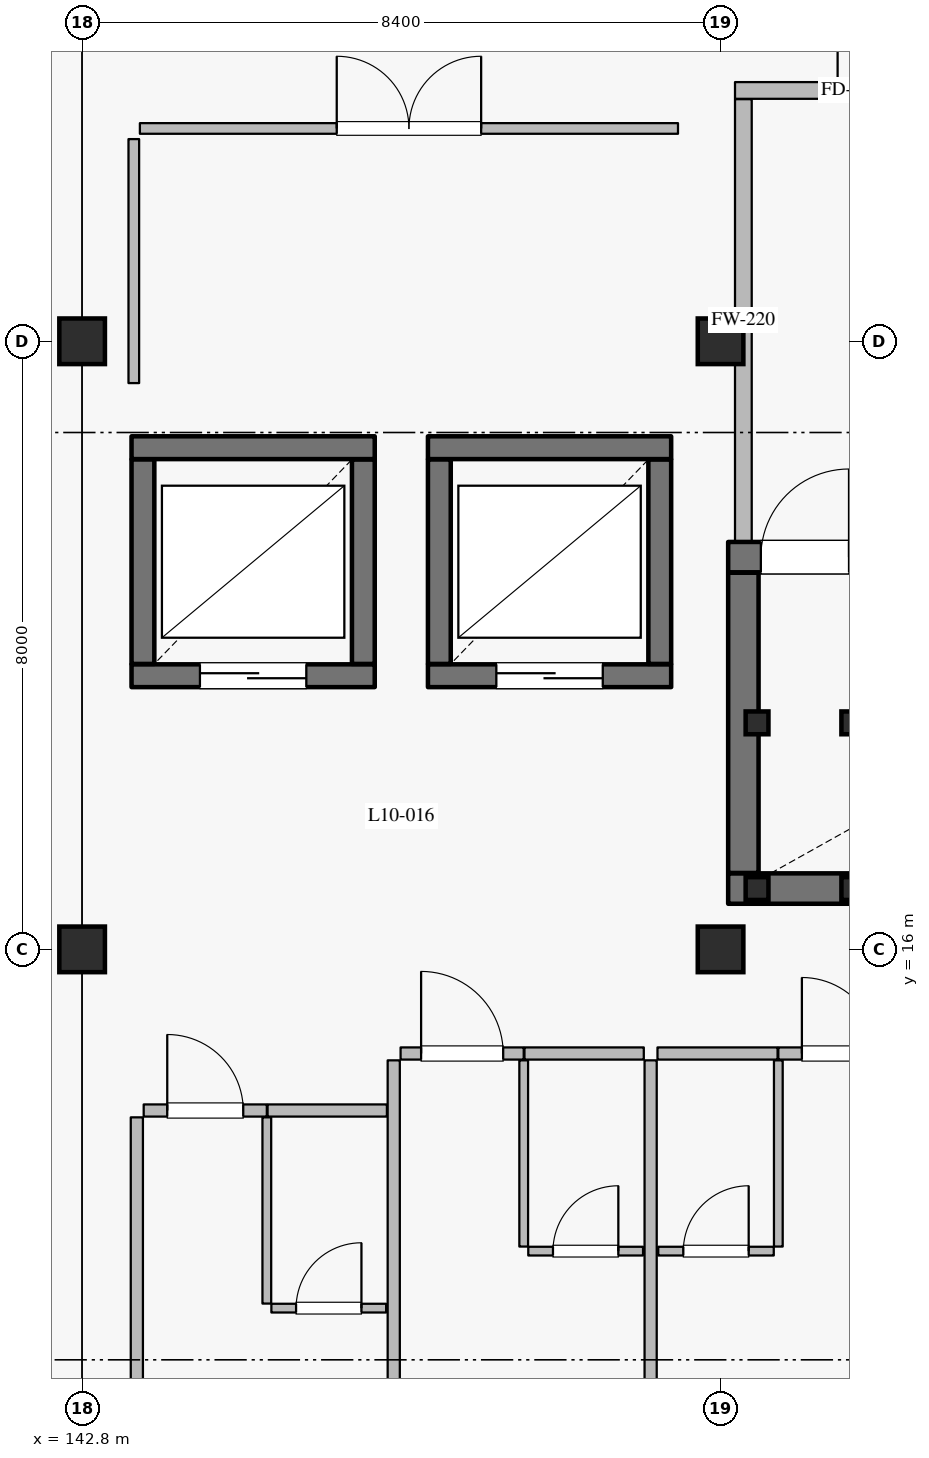
"""IFC4 building model, lengths in metres.
Left out: names, types, materials, properties, quantities, classifications, styles, units other than length and angle.
Written with IfcOpenShell. Run it as: python <this file> out.ifc"""

import sys

from ifc_helpers import new_model, si_unit, direction, frame, frame_2d, origin, origin_2d, place, context, subcontext, project, spatial, rectangle, hollow_rectangle, extrude, element, fill, save


model = new_model("IFC4")
c1 = context("Model", 3, precision=1e-05, world=origin(), true_north=direction((0.0, 1.0)))
c2 = subcontext(c1, "Body", "Model", "MODEL_VIEW")
j1 = project(units=[si_unit("LENGTHUNIT", "METRE"), si_unit("PLANEANGLEUNIT", "RADIAN")], contexts=[c1])
p1 = place(None, origin())
s1 = spatial("IfcSite", under=j1, at=p1, CompositionType="ELEMENT")
p2 = place(p1, origin())
s2 = spatial("IfcBuilding", under=s1, at=p2, CompositionType="ELEMENT")
p3 = place(p2, frame((0.0, 0.0, 43.2)))
s3 = spatial("IfcBuildingStorey", under=s2, at=p3, CompositionType="ELEMENT", Elevation=43.2)
for number, where, z_axis, x_axis in (
    (1, (142.8, 16.0, 0.0), (0.0, 0.0, 1.0), (1.0, 0.0, 0.0)),
    (2, (151.2, 24.0, 0.0), (0.0, 0.0, 1.0), (1.0, 0.0, 0.0)),
    (3, (142.8, 24.0, 0.0), (0.0, 0.0, 1.0), (1.0, 0.0, 0.0)),
    (4, (151.2, 16.0, 0.0), (0.0, 0.0, 1.0), (1.0, 0.0, 0.0)),
):
    element("IfcColumn", number, at=place(p3, frame(where, z_axis=z_axis, x_axis=x_axis)), inside=s3, PredefinedType="COLUMN", context=c2, shape_type="SweptSolid", body=[
        extrude(rectangle(XDim=0.6, YDim=0.6, at=origin_2d()), origin(), (0.0, 0.0, 1.0), 4.2),
    ])
p4 = place(p3, frame((143.45, 19.6, 0.0), z_axis=(0.0, 0.0, 1.0), x_axis=(1.0, 0.0, 0.0)))
e5 = element("IfcWall", 5, at=p4, inside=s3, PredefinedType="SHEAR", context=c2, shape_type="SweptSolid", body=[
    extrude(rectangle(XDim=3.2, YDim=0.3, at=frame_2d((1.6, 0.0))), origin(), (0.0, 0.0, 1.0), 3.935),
])
p5 = place(p4, frame((0.9, 0.0, 0.0)))
e6 = element("IfcOpeningElement", 6, at=p5, cuts=e5, PredefinedType="OPENING", context=c2, shape_type="SweptSolid", body=[
    extrude(rectangle(XDim=1.4, YDim=2.35, at=frame_2d((0.7, 1.175))), frame((0.0, 0.16, 0.0), z_axis=(0.0, -1.0, 0.0), x_axis=(1.0, 0.0, 0.0)), (0.0, 0.0, 1.0), 0.32),
])
p6 = place(p3, frame((146.5, 19.755, 0.0), z_axis=(0.0, 0.0, 1.0), x_axis=(0.0, 1.0, 0.0)))
e7 = element("IfcWall", 7, at=p6, inside=s3, PredefinedType="SHEAR", context=c2, shape_type="SweptSolid", body=[
    extrude(rectangle(XDim=2.69, YDim=0.3, at=frame_2d((1.345, 0.0))), origin(), (0.0, 0.0, 1.0), 3.935),
])
p7 = place(p3, frame((146.65, 22.6, 0.0), z_axis=(0.0, 0.0, 1.0), x_axis=(-1.0, 0.0, 0.0)))
e8 = element("IfcWall", 8, at=p7, inside=s3, PredefinedType="SHEAR", context=c2, shape_type="SweptSolid", body=[
    extrude(rectangle(XDim=3.2, YDim=0.3, at=frame_2d((1.6, 0.0))), origin(), (0.0, 0.0, 1.0), 3.935),
])
p8 = place(p3, frame((143.6, 22.445, 0.0), z_axis=(0.0, 0.0, 1.0), x_axis=(0.0, -1.0, 0.0)))
e9 = element("IfcWall", 9, at=p8, inside=s3, PredefinedType="SHEAR", context=c2, shape_type="SweptSolid", body=[
    extrude(rectangle(XDim=2.69, YDim=0.3, at=frame_2d((1.345, 0.0))), origin(), (0.0, 0.0, 1.0), 3.935),
])
p9 = place(p3, frame((147.35, 19.6, 0.0), z_axis=(0.0, 0.0, 1.0), x_axis=(1.0, 0.0, 0.0)))
e10 = element("IfcWall", 10, at=p9, inside=s3, PredefinedType="SHEAR", context=c2, shape_type="SweptSolid", body=[
    extrude(rectangle(XDim=3.2, YDim=0.3, at=frame_2d((1.6, 0.0))), origin(), (0.0, 0.0, 1.0), 3.935),
])
p10 = place(p9, frame((0.9, 0.0, 0.0)))
e11 = element("IfcOpeningElement", 11, at=p10, cuts=e10, PredefinedType="OPENING", context=c2, shape_type="SweptSolid", body=[
    extrude(rectangle(XDim=1.4, YDim=2.35, at=frame_2d((0.7, 1.175))), frame((0.0, 0.16, 0.0), z_axis=(0.0, -1.0, 0.0), x_axis=(1.0, 0.0, 0.0)), (0.0, 0.0, 1.0), 0.32),
])
p11 = place(p3, frame((150.4, 19.755, 0.0), z_axis=(0.0, 0.0, 1.0), x_axis=(0.0, 1.0, 0.0)))
e12 = element("IfcWall", 12, at=p11, inside=s3, PredefinedType="SHEAR", context=c2, shape_type="SweptSolid", body=[
    extrude(rectangle(XDim=2.69, YDim=0.3, at=frame_2d((1.345, 0.0))), origin(), (0.0, 0.0, 1.0), 3.935),
])
p12 = place(p3, frame((150.55, 22.6, 0.0), z_axis=(0.0, 0.0, 1.0), x_axis=(-1.0, 0.0, 0.0)))
e13 = element("IfcWall", 13, at=p12, inside=s3, PredefinedType="SHEAR", context=c2, shape_type="SweptSolid", body=[
    extrude(rectangle(XDim=3.2, YDim=0.3, at=frame_2d((1.6, 0.0))), origin(), (0.0, 0.0, 1.0), 3.935),
])
p13 = place(p3, frame((147.5, 22.445, 0.0), z_axis=(0.0, 0.0, 1.0), x_axis=(0.0, -1.0, 0.0)))
e14 = element("IfcWall", 14, at=p13, inside=s3, PredefinedType="SHEAR", context=c2, shape_type="SweptSolid", body=[
    extrude(rectangle(XDim=2.69, YDim=0.3, at=frame_2d((1.345, 0.0))), origin(), (0.0, 0.0, 1.0), 3.935),
])
p14 = place(p3, frame((151.3, 16.8, 0.0), z_axis=(0.0, 0.0, 1.0), x_axis=(1.0, 0.0, 0.0)))
e15 = element("IfcWall", 15, at=p14, inside=s3, PredefinedType="SHEAR", context=c2, shape_type="SweptSolid", body=[
    extrude(rectangle(XDim=8.2, YDim=0.4, at=frame_2d((4.1, 0.0))), origin(), (0.0, 0.0, 1.0), 3.935),
])
p15 = place(p3, frame((151.3, 21.16, 0.0), z_axis=(0.0, 0.0, 1.0), x_axis=(1.0, 0.0, 0.0)))
e16 = element("IfcWall", 16, at=p15, inside=s3, PredefinedType="SHEAR", context=c2, shape_type="SweptSolid", body=[
    extrude(rectangle(XDim=8.2, YDim=0.4, at=frame_2d((4.1, 0.0))), origin(), (0.0, 0.0, 1.0), 3.935),
])
p16 = place(p15, frame((0.43, 0.0, 0.0)))
e17 = element("IfcOpeningElement", 17, at=p16, cuts=e16, PredefinedType="OPENING", context=c2, shape_type="SweptSolid", body=[
    extrude(rectangle(XDim=1.16, YDim=2.2, at=frame_2d((0.58, 1.1))), frame((0.0, 0.21, 0.0), z_axis=(0.0, -1.0, 0.0), x_axis=(1.0, 0.0, 0.0)), (0.0, 0.0, 1.0), 0.42),
])
p17 = place(p3, frame((151.5, 17.005, 0.0), z_axis=(0.0, 0.0, 1.0), x_axis=(0.0, 1.0, 0.0)))
e18 = element("IfcWall", 18, at=p17, inside=s3, PredefinedType="SHEAR", context=c2, shape_type="SweptSolid", body=[
    extrude(rectangle(XDim=3.95, YDim=0.4, at=frame_2d((1.975, 0.0))), origin(), (0.0, 0.0, 1.0), 3.935),
])
p18 = place(p3, frame((151.5, 21.365, 0.0), z_axis=(0.0, 0.0, 1.0), x_axis=(0.0, 1.0, 0.0)))
e19 = element("IfcWall", 19, at=p18, inside=s3, PredefinedType="PARTITIONING", context=c2, shape_type="SweptSolid", body=[
    extrude(rectangle(XDim=5.82, YDim=0.22, at=frame_2d((2.91, 0.0))), origin(), (0.0, 0.0, 1.0), 3.935),
])
p19 = place(p3, frame((151.39, 27.3, 0.0), z_axis=(0.0, 0.0, 1.0), x_axis=(1.0, 0.0, 0.0)))
e20 = element("IfcWall", 20, at=p19, inside=s3, PredefinedType="PARTITIONING", context=c2, shape_type="SweptSolid", body=[
    extrude(rectangle(XDim=3.82, YDim=0.22, at=frame_2d((1.91, 0.0))), origin(), (0.0, 0.0, 1.0), 3.935),
])
p20 = place(p19, frame((1.35, 0.0, 0.0)))
e21 = element("IfcOpeningElement", 21, at=p20, cuts=e20, PredefinedType="OPENING", context=c2, shape_type="SweptSolid", body=[
    extrude(rectangle(XDim=1.12, YDim=2.2, at=frame_2d((0.56, 1.1))), frame((0.0, 0.12, 0.0), z_axis=(0.0, -1.0, 0.0), x_axis=(1.0, 0.0, 0.0)), (0.0, 0.0, 1.0), 0.24),
])
for number, where, z_axis, x_axis in (
    (22, (151.68, 16.8, 0.0), (0.0, 0.0, 1.0), (1.0, 0.0, 0.0)),
    (23, (151.68, 18.98, 0.0), (0.0, 0.0, 1.0), (1.0, 0.0, 0.0)),
    (24, (152.94, 16.8, 0.0), (0.0, 0.0, 1.0), (1.0, 0.0, 0.0)),
    (25, (152.94, 18.98, 0.0), (0.0, 0.0, 1.0), (1.0, 0.0, 0.0)),
):
    element("IfcColumn", number, at=place(p3, frame(where, z_axis=z_axis, x_axis=x_axis)), inside=s3, PredefinedType="COLUMN", context=c2, shape_type="SweptSolid", body=[
        extrude(hollow_rectangle(XDim=0.3, YDim=0.3, WallThickness=0.012, at=origin_2d()), origin(), (0.0, 0.0, 1.0), 4.02),
    ])
p21 = place(p3, frame((143.61, 13.88, 0.0), z_axis=(0.0, 0.0, 1.0), x_axis=(1.0, 0.0, 0.0)))
e26 = element("IfcWall", 26, at=p21, inside=s3, PredefinedType="PARTITIONING", context=c2, shape_type="SweptSolid", body=[
    extrude(rectangle(XDim=1.62, YDim=0.16, at=frame_2d((0.81, 0.0))), origin(), (0.0, 0.0, 1.0), 3.935),
])
p22 = place(p21, frame((0.31, 0.0, 0.0)))
e27 = element("IfcOpeningElement", 27, at=p22, cuts=e26, PredefinedType="OPENING", context=c2, shape_type="SweptSolid", body=[
    extrude(rectangle(XDim=1.0, YDim=2.25, at=frame_2d((0.5, 1.125))), frame((0.0, 0.09, 0.0), z_axis=(0.0, -1.0, 0.0), x_axis=(1.0, 0.0, 0.0)), (0.0, 0.0, 1.0), 0.18),
])
p23 = place(p3, frame((145.24, 13.88, 0.0), z_axis=(0.0, 0.0, 1.0), x_axis=(1.0, 0.0, 0.0)))
e28 = element("IfcWall", 28, at=p23, inside=s3, PredefinedType="PARTITIONING", context=c2, shape_type="SweptSolid", body=[
    extrude(rectangle(XDim=1.57, YDim=0.16, at=frame_2d((0.785, 0.0))), origin(), (0.0, 0.0, 1.0), 3.935),
])
p24 = place(p3, frame((145.23, 11.34, 0.0), z_axis=(0.0, 0.0, 1.0), x_axis=(0.0, 1.0, 0.0)))
e29 = element("IfcWall", 29, at=p24, inside=s3, PredefinedType="PARTITIONING", context=c2, shape_type="SweptSolid", body=[
    extrude(rectangle(XDim=2.45, YDim=0.115, at=frame_2d((1.225, 0.0))), origin(), (0.0, 0.0, 1.0), 3.935),
])
p25 = place(p3, frame((145.29, 11.28, 0.0), z_axis=(0.0, 0.0, 1.0), x_axis=(1.0, 0.0, 0.0)))
e30 = element("IfcWall", 30, at=p25, inside=s3, PredefinedType="PARTITIONING", context=c2, shape_type="SweptSolid", body=[
    extrude(rectangle(XDim=1.51, YDim=0.115, at=frame_2d((0.755, 0.0))), origin(), (0.0, 0.0, 1.0), 3.935),
])
p26 = place(p25, frame((0.325, 0.0, 0.0)))
e31 = element("IfcOpeningElement", 31, at=p26, cuts=e30, PredefinedType="OPENING", context=c2, shape_type="SweptSolid", body=[
    extrude(rectangle(XDim=0.86, YDim=2.12, at=frame_2d((0.43, 1.06))), frame((0.0, 0.067, 0.0), z_axis=(0.0, -1.0, 0.0), x_axis=(1.0, 0.0, 0.0)), (0.0, 0.0, 1.0), 0.135),
])
p27 = place(p3, frame((143.52, 4.24, 0.0), z_axis=(0.0, 0.0, 1.0), x_axis=(0.0, 1.0, 0.0)))
e32 = element("IfcWall", 32, at=p27, inside=s3, PredefinedType="PARTITIONING", context=c2, shape_type="SweptSolid", body=[
    extrude(rectangle(XDim=9.55, YDim=0.16, at=frame_2d((4.775, 0.0))), origin(), (0.0, 0.0, 1.0), 3.935),
])
p28 = place(p3, frame((146.99, 14.63, 0.0), z_axis=(0.0, 0.0, 1.0), x_axis=(1.0, 0.0, 0.0)))
e33 = element("IfcWall", 33, at=p28, inside=s3, PredefinedType="PARTITIONING", context=c2, shape_type="SweptSolid", body=[
    extrude(rectangle(XDim=1.62, YDim=0.16, at=frame_2d((0.81, 0.0))), origin(), (0.0, 0.0, 1.0), 3.935),
])
p29 = place(p28, frame((0.27, 0.0, 0.0)))
e34 = element("IfcOpeningElement", 34, at=p29, cuts=e33, PredefinedType="OPENING", context=c2, shape_type="SweptSolid", body=[
    extrude(rectangle(XDim=1.08, YDim=2.3, at=frame_2d((0.54, 1.15))), frame((0.0, 0.09, 0.0), z_axis=(0.0, -1.0, 0.0), x_axis=(1.0, 0.0, 0.0)), (0.0, 0.0, 1.0), 0.18),
])
p30 = place(p3, frame((148.62, 14.63, 0.0), z_axis=(0.0, 0.0, 1.0), x_axis=(1.0, 0.0, 0.0)))
e35 = element("IfcWall", 35, at=p30, inside=s3, PredefinedType="PARTITIONING", context=c2, shape_type="SweptSolid", body=[
    extrude(rectangle(XDim=1.57, YDim=0.16, at=frame_2d((0.785, 0.0))), origin(), (0.0, 0.0, 1.0), 3.935),
])
p31 = place(p3, frame((148.61, 12.09, 0.0), z_axis=(0.0, 0.0, 1.0), x_axis=(0.0, 1.0, 0.0)))
e36 = element("IfcWall", 36, at=p31, inside=s3, PredefinedType="PARTITIONING", context=c2, shape_type="SweptSolid", body=[
    extrude(rectangle(XDim=2.45, YDim=0.115, at=frame_2d((1.225, 0.0))), origin(), (0.0, 0.0, 1.0), 3.935),
])
p32 = place(p3, frame((148.67, 12.03, 0.0), z_axis=(0.0, 0.0, 1.0), x_axis=(1.0, 0.0, 0.0)))
e37 = element("IfcWall", 37, at=p32, inside=s3, PredefinedType="PARTITIONING", context=c2, shape_type="SweptSolid", body=[
    extrude(rectangle(XDim=1.51, YDim=0.115, at=frame_2d((0.755, 0.0))), origin(), (0.0, 0.0, 1.0), 3.935),
])
p33 = place(p32, frame((0.325, 0.0, 0.0)))
e38 = element("IfcOpeningElement", 38, at=p33, cuts=e37, PredefinedType="OPENING", context=c2, shape_type="SweptSolid", body=[
    extrude(rectangle(XDim=0.86, YDim=2.12, at=frame_2d((0.43, 1.06))), frame((0.0, 0.067, 0.0), z_axis=(0.0, -1.0, 0.0), x_axis=(1.0, 0.0, 0.0)), (0.0, 0.0, 1.0), 0.135),
])
p34 = place(p3, frame((146.9, 7.46, 0.0), z_axis=(0.0, 0.0, 1.0), x_axis=(0.0, 1.0, 0.0)))
e39 = element("IfcWall", 39, at=p34, inside=s3, PredefinedType="PARTITIONING", context=c2, shape_type="SweptSolid", body=[
    extrude(rectangle(XDim=7.08, YDim=0.16, at=frame_2d((3.54, 0.0))), origin(), (0.0, 0.0, 1.0), 3.935),
])
p35 = place(p3, frame((150.37, 14.63, 0.0), z_axis=(0.0, 0.0, 1.0), x_axis=(1.0, 0.0, 0.0)))
e40 = element("IfcWall", 40, at=p35, inside=s3, PredefinedType="PARTITIONING", context=c2, shape_type="SweptSolid", body=[
    extrude(rectangle(XDim=1.58, YDim=0.16, at=frame_2d((0.79, 0.0))), origin(), (0.0, 0.0, 1.0), 3.935),
])
p36 = place(p3, frame((151.96, 14.63, 0.0), z_axis=(0.0, 0.0, 1.0), x_axis=(1.0, 0.0, 0.0)))
e41 = element("IfcWall", 41, at=p36, inside=s3, PredefinedType="PARTITIONING", context=c2, shape_type="SweptSolid", body=[
    extrude(rectangle(XDim=1.62, YDim=0.16, at=frame_2d((0.81, 0.0))), origin(), (0.0, 0.0, 1.0), 3.935),
])
p37 = place(p36, frame((0.31, 0.0, 0.0)))
e42 = element("IfcOpeningElement", 42, at=p37, cuts=e41, PredefinedType="OPENING", context=c2, shape_type="SweptSolid", body=[
    extrude(rectangle(XDim=1.0, YDim=2.25, at=frame_2d((0.5, 1.125))), frame((0.0, 0.09, 0.0), z_axis=(0.0, -1.0, 0.0), x_axis=(1.0, 0.0, 0.0)), (0.0, 0.0, 1.0), 0.18),
])
p38 = place(p3, frame((151.96, 12.09, 0.0), z_axis=(0.0, 0.0, 1.0), x_axis=(0.0, 1.0, 0.0)))
e43 = element("IfcWall", 43, at=p38, inside=s3, PredefinedType="PARTITIONING", context=c2, shape_type="SweptSolid", body=[
    extrude(rectangle(XDim=2.45, YDim=0.115, at=frame_2d((1.225, 0.0))), origin(), (0.0, 0.0, 1.0), 3.935),
])
p39 = place(p3, frame((150.38, 12.03, 0.0), z_axis=(0.0, 0.0, 1.0), x_axis=(1.0, 0.0, 0.0)))
e44 = element("IfcWall", 44, at=p39, inside=s3, PredefinedType="PARTITIONING", context=c2, shape_type="SweptSolid", body=[
    extrude(rectangle(XDim=1.52, YDim=0.115, at=frame_2d((0.76, 0.0))), origin(), (0.0, 0.0, 1.0), 3.935),
])
p40 = place(p39, frame((0.33, 0.0, 0.0)))
e45 = element("IfcOpeningElement", 45, at=p40, cuts=e44, PredefinedType="OPENING", context=c2, shape_type="SweptSolid", body=[
    extrude(rectangle(XDim=0.86, YDim=2.12, at=frame_2d((0.43, 1.06))), frame((0.0, 0.067, 0.0), z_axis=(0.0, -1.0, 0.0), x_axis=(1.0, 0.0, 0.0)), (0.0, 0.0, 1.0), 0.135),
])
p41 = place(p3, frame((150.28, 8.34, 0.0), z_axis=(0.0, 0.0, 1.0), x_axis=(0.0, 1.0, 0.0)))
e46 = element("IfcWall", 46, at=p41, inside=s3, PredefinedType="PARTITIONING", context=c2, shape_type="SweptSolid", body=[
    extrude(rectangle(XDim=6.2, YDim=0.16, at=frame_2d((3.1, 0.0))), origin(), (0.0, 0.0, 1.0), 3.935),
])
p42 = place(p3, frame((143.56, 26.8, 0.0), z_axis=(0.0, 0.0, 1.0), x_axis=(1.0, 0.0, 0.0)))
e47 = element("IfcWall", 47, at=p42, inside=s3, PredefinedType="PARTITIONING", context=c2, shape_type="SweptSolid", body=[
    extrude(rectangle(XDim=7.08, YDim=0.14, at=frame_2d((3.54, 0.0))), origin(), (0.0, 0.0, 1.0), 3.935),
])
p43 = place(p42, frame((2.59, 0.0, 0.0)))
e48 = element("IfcOpeningElement", 48, at=p43, cuts=e47, PredefinedType="OPENING", context=c2, shape_type="SweptSolid", body=[
    extrude(rectangle(XDim=1.9, YDim=2.4, at=frame_2d((0.95, 1.2))), frame((0.0, 0.08, 0.0), z_axis=(0.0, -1.0, 0.0), x_axis=(1.0, 0.0, 0.0)), (0.0, 0.0, 1.0), 0.16),
])
p44 = place(p3, frame((143.48, 23.45, 0.0), z_axis=(0.0, 0.0, 1.0), x_axis=(0.0, 1.0, 0.0)))
e49 = element("IfcWall", 49, at=p44, inside=s3, PredefinedType="PARTITIONING", context=c2, shape_type="SweptSolid", body=[
    extrude(rectangle(XDim=3.21, YDim=0.14, at=frame_2d((1.605, 0.0))), origin(), (0.0, 0.0, 1.0), 3.935),
])
p45 = place(p5, origin())
e50 = element("IfcDoor", 50, at=p45, inside=s3, OperationType="DOUBLE_DOOR_SLIDING", PredefinedType="DOOR", context=c2, shape_type="SweptSolid", body=[
    extrude(rectangle(XDim=1.4, YDim=2.35, at=frame_2d((0.7, 1.175))), frame((0.0, 0.025, 0.0), z_axis=(0.0, -1.0, 0.0), x_axis=(1.0, 0.0, 0.0)), (0.0, 0.0, 1.0), 0.05),
])
fill(e6, e50)
p46 = place(p10, origin())
e51 = element("IfcDoor", 51, at=p46, inside=s3, OperationType="DOUBLE_DOOR_SLIDING", PredefinedType="DOOR", context=c2, shape_type="SweptSolid", body=[
    extrude(rectangle(XDim=1.4, YDim=2.35, at=frame_2d((0.7, 1.175))), frame((0.0, 0.025, 0.0), z_axis=(0.0, -1.0, 0.0), x_axis=(1.0, 0.0, 0.0)), (0.0, 0.0, 1.0), 0.05),
])
fill(e11, e51)
p47 = place(p16, origin())
e52 = element("IfcDoor", 52, at=p47, inside=s3, OperationType="SINGLE_SWING_RIGHT", PredefinedType="DOOR", context=c2, shape_type="SweptSolid", body=[
    extrude(rectangle(XDim=1.16, YDim=2.2, at=frame_2d((0.58, 1.1))), frame((0.0, 0.025, 0.0), z_axis=(0.0, -1.0, 0.0), x_axis=(1.0, 0.0, 0.0)), (0.0, 0.0, 1.0), 0.05),
])
fill(e17, e52)
p48 = place(p20, origin())
e53 = element("IfcDoor", 53, at=p48, inside=s3, OperationType="SINGLE_SWING_LEFT", PredefinedType="DOOR", context=c2, shape_type="SweptSolid", body=[
    extrude(rectangle(XDim=1.12, YDim=2.2, at=frame_2d((0.56, 1.1))), frame((0.0, 0.025, 0.0), z_axis=(0.0, -1.0, 0.0), x_axis=(1.0, 0.0, 0.0)), (0.0, 0.0, 1.0), 0.05),
])
fill(e21, e53)
p49 = place(p22, origin())
e54 = element("IfcDoor", 54, at=p49, inside=s3, OperationType="SINGLE_SWING_LEFT", PredefinedType="DOOR", context=c2, shape_type="SweptSolid", body=[
    extrude(rectangle(XDim=1.0, YDim=2.25, at=frame_2d((0.5, 1.125))), frame((0.0, 0.025, 0.0), z_axis=(0.0, -1.0, 0.0), x_axis=(1.0, 0.0, 0.0)), (0.0, 0.0, 1.0), 0.05),
])
fill(e27, e54)
p50 = place(p26, origin())
e55 = element("IfcDoor", 55, at=p50, inside=s3, OperationType="SINGLE_SWING_RIGHT", PredefinedType="DOOR", context=c2, shape_type="SweptSolid", body=[
    extrude(rectangle(XDim=0.86, YDim=2.12, at=frame_2d((0.43, 1.06))), frame((0.0, 0.025, 0.0), z_axis=(0.0, -1.0, 0.0), x_axis=(1.0, 0.0, 0.0)), (0.0, 0.0, 1.0), 0.05),
])
fill(e31, e55)
p51 = place(p29, origin())
e56 = element("IfcDoor", 56, at=p51, inside=s3, OperationType="SINGLE_SWING_LEFT", PredefinedType="DOOR", context=c2, shape_type="SweptSolid", body=[
    extrude(rectangle(XDim=1.08, YDim=2.3, at=frame_2d((0.54, 1.15))), frame((0.0, 0.025, 0.0), z_axis=(0.0, -1.0, 0.0), x_axis=(1.0, 0.0, 0.0)), (0.0, 0.0, 1.0), 0.05),
])
fill(e34, e56)
p52 = place(p33, origin())
e57 = element("IfcDoor", 57, at=p52, inside=s3, OperationType="SINGLE_SWING_RIGHT", PredefinedType="DOOR", context=c2, shape_type="SweptSolid", body=[
    extrude(rectangle(XDim=0.86, YDim=2.12, at=frame_2d((0.43, 1.06))), frame((0.0, 0.025, 0.0), z_axis=(0.0, -1.0, 0.0), x_axis=(1.0, 0.0, 0.0)), (0.0, 0.0, 1.0), 0.05),
])
fill(e38, e57)
p53 = place(p37, origin())
e58 = element("IfcDoor", 58, at=p53, inside=s3, OperationType="SINGLE_SWING_LEFT", PredefinedType="DOOR", context=c2, shape_type="SweptSolid", body=[
    extrude(rectangle(XDim=1.0, YDim=2.25, at=frame_2d((0.5, 1.125))), frame((0.0, 0.025, 0.0), z_axis=(0.0, -1.0, 0.0), x_axis=(1.0, 0.0, 0.0)), (0.0, 0.0, 1.0), 0.05),
])
fill(e42, e58)
p54 = place(p40, origin())
e59 = element("IfcDoor", 59, at=p54, inside=s3, OperationType="SINGLE_SWING_RIGHT", PredefinedType="DOOR", context=c2, shape_type="SweptSolid", body=[
    extrude(rectangle(XDim=0.86, YDim=2.12, at=frame_2d((0.43, 1.06))), frame((0.0, 0.025, 0.0), z_axis=(0.0, -1.0, 0.0), x_axis=(1.0, 0.0, 0.0)), (0.0, 0.0, 1.0), 0.05),
])
fill(e45, e59)
p55 = place(p43, origin())
e60 = element("IfcDoor", 60, at=p55, inside=s3, OperationType="DOUBLE_DOOR_SINGLE_SWING", PredefinedType="DOOR", context=c2, shape_type="SweptSolid", body=[
    extrude(rectangle(XDim=1.9, YDim=2.4, at=frame_2d((0.95, 1.2))), frame((0.0, 0.025, 0.0), z_axis=(0.0, -1.0, 0.0), x_axis=(1.0, 0.0, 0.0)), (0.0, 0.0, 1.0), 0.05),
])
fill(e48, e60)
save(model, sys.argv[1])
